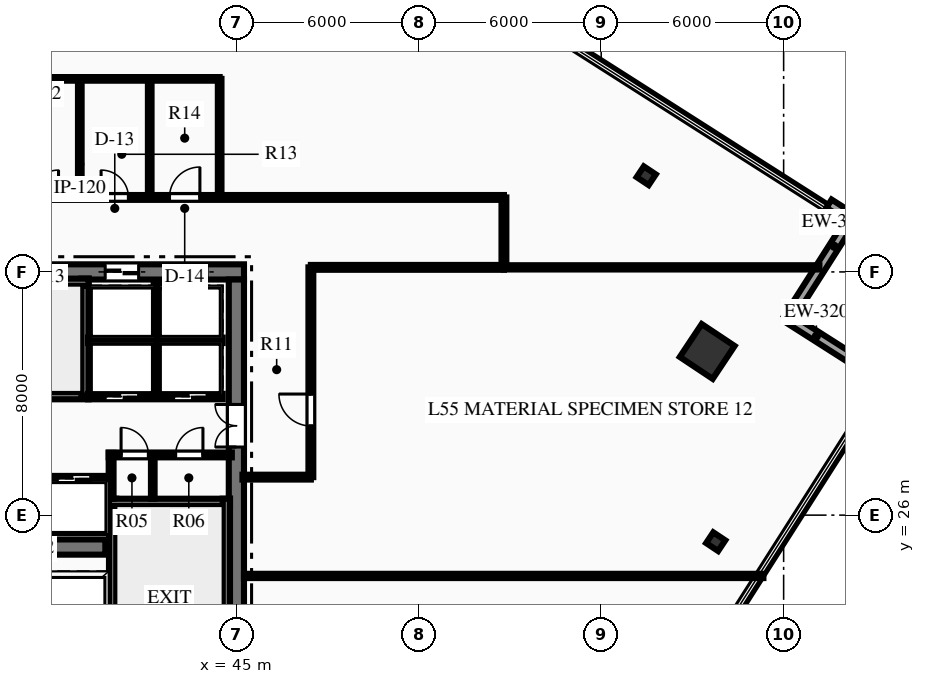
"""IFC4 building model, lengths in metres.
Left out: names, types, materials, properties, quantities, classifications, styles, units other than length and angle.
Written with IfcOpenShell. Run it as: python <this file> out.ifc"""

import sys

from ifc_helpers import new_model, si_unit, direction, frame, frame_2d, origin, origin_2d, place, context, subcontext, project, spatial, rectangle, hollow_rectangle, i_section, extrude, element, fill, save


model = new_model("IFC4")
c1 = context("Model", 3, precision=1e-05, world=origin(), true_north=direction((0.0, 1.0)))
c2 = subcontext(c1, "Body", "Model", "MODEL_VIEW")
j1 = project(units=[si_unit("LENGTHUNIT", "METRE"), si_unit("PLANEANGLEUNIT", "RADIAN")], contexts=[c1])
p1 = place(None, origin())
s1 = spatial("IfcSite", under=j1, at=p1, CompositionType="ELEMENT")
p2 = place(p1, origin())
s2 = spatial("IfcBuilding", under=s1, at=p2, CompositionType="ELEMENT")
p3 = place(p2, frame((0.0, 0.0, 220.95)))
s3 = spatial("IfcBuildingStorey", under=s2, at=p3, CompositionType="ELEMENT", Elevation=220.95)
p4 = place(p3, frame((26.75, 34.0, 0.0), z_axis=(0.0, 0.0, 1.0), x_axis=(1.0, 0.0, 0.0)))
e1 = element("IfcWall", 1, at=p4, inside=s3, PredefinedType="SHEAR", context=c2, shape_type="SweptSolid", body=[
    extrude(rectangle(XDim=18.5, YDim=0.5, at=frame_2d((9.25, 0.0))), origin(), (0.0, 0.0, 1.0), 3.75),
])
p5 = place(p4, frame((13.935, 0.0, 0.0)))
e2 = element("IfcOpeningElement", 2, at=p5, cuts=e1, PredefinedType="OPENING", context=c2, shape_type="SweptSolid", body=[
    extrude(rectangle(XDim=1.1, YDim=2.15, at=frame_2d((0.55, 1.075))), frame((0.0, 0.26, 0.0), z_axis=(0.0, -1.0, 0.0), x_axis=(1.0, 0.0, 0.0)), (0.0, 0.0, 1.0), 0.52),
])
p6 = place(p4, frame((16.185, 0.0, 0.0)))
e3 = element("IfcOpeningElement", 3, at=p6, cuts=e1, PredefinedType="OPENING", context=c2, shape_type="SweptSolid", body=[
    extrude(rectangle(XDim=1.1, YDim=2.15, at=frame_2d((0.55, 1.075))), frame((0.0, 0.26, 0.0), z_axis=(0.0, -1.0, 0.0), x_axis=(1.0, 0.0, 0.0)), (0.0, 0.0, 1.0), 0.52),
])
p7 = place(p3, frame((45.0, 18.25, 0.0), z_axis=(0.0, 0.0, 1.0), x_axis=(0.0, 1.0, 0.0)))
e4 = element("IfcWall", 4, at=p7, inside=s3, PredefinedType="SHEAR", context=c2, shape_type="SweptSolid", body=[
    extrude(rectangle(XDim=15.5, YDim=0.5, at=frame_2d((7.75, 0.0))), origin(), (0.0, 0.0, 1.0), 3.75),
])
p8 = place(p7, frame((9.99, 0.0, 0.0)))
e5 = element("IfcOpeningElement", 5, at=p8, cuts=e4, PredefinedType="OPENING", context=c2, shape_type="SweptSolid", body=[
    extrude(rectangle(XDim=1.4, YDim=2.2, at=frame_2d((0.7, 1.1))), frame((0.0, 0.26, 0.0), z_axis=(0.0, -1.0, 0.0), x_axis=(1.0, 0.0, 0.0)), (0.0, 0.0, 1.0), 0.52),
])
p9 = place(p3, frame((31.31, 24.95, 0.0), z_axis=(0.0, 0.0, 1.0), x_axis=(1.0, 0.0, 0.0)))
e6 = element("IfcWall", 6, at=p9, inside=s3, PredefinedType="SHEAR", context=c2, shape_type="SweptSolid", body=[
    extrude(rectangle(XDim=9.38, YDim=0.5, at=frame_2d((4.69, 0.0))), origin(), (0.0, 0.0, 1.0), 3.75),
])
p10 = place(p3, frame((40.93, 18.28, 0.0), z_axis=(0.0, 0.0, 1.0), x_axis=(0.0, 1.0, 0.0)))
e7 = element("IfcWall", 7, at=p10, inside=s3, PredefinedType="SHEAR", context=c2, shape_type="SweptSolid", body=[
    extrude(rectangle(XDim=8.26, YDim=0.24, at=frame_2d((4.13, 0.0))), origin(), (0.0, 0.0, 1.0), 3.75),
])
p11 = place(p10, frame((0.365, 0.0, 0.0)))
e8 = element("IfcOpeningElement", 8, at=p11, cuts=e7, PredefinedType="OPENING", context=c2, shape_type="SweptSolid", body=[
    extrude(rectangle(XDim=1.05, YDim=2.15, at=frame_2d((0.525, 1.075))), frame((0.0, 0.13, 0.0), z_axis=(0.0, -1.0, 0.0), x_axis=(1.0, 0.0, 0.0)), (0.0, 0.0, 1.0), 0.26),
])
p12 = place(p3, frame((40.81, 26.42, 0.0), z_axis=(0.0, 0.0, 1.0), x_axis=(1.0, 0.0, 0.0)))
e9 = element("IfcWall", 9, at=p12, inside=s3, PredefinedType="SHEAR", context=c2, shape_type="SweptSolid", body=[
    extrude(rectangle(XDim=3.98, YDim=0.24, at=frame_2d((1.99, 0.0))), origin(), (0.0, 0.0, 1.0), 3.75),
])
p13 = place(p3, frame((44.67, 18.28, 0.0), z_axis=(0.0, 0.0, 1.0), x_axis=(0.0, 1.0, 0.0)))
e10 = element("IfcWall", 10, at=p13, inside=s3, PredefinedType="SHEAR", context=c2, shape_type="SweptSolid", body=[
    extrude(rectangle(XDim=8.26, YDim=0.24, at=frame_2d((4.13, 0.0))), origin(), (0.0, 0.0, 1.0), 3.75),
])
p14 = place(p3, frame((31.76, 29.93, 0.0), z_axis=(0.0, 0.0, 1.0), x_axis=(1.0, 0.0, 0.0)))
e11 = element("IfcWall", 11, at=p14, inside=s3, PredefinedType="SHEAR", context=c2, shape_type="SweptSolid", body=[
    extrude(rectangle(XDim=8.38, YDim=0.24, at=frame_2d((4.19, 0.0))), origin(), (0.0, 0.0, 1.0), 3.75),
])
p15 = place(p14, frame((0.565, 0.0, 0.0)))
e12 = element("IfcOpeningElement", 12, at=p15, cuts=e11, PredefinedType="OPENING", context=c2, shape_type="SweptSolid", body=[
    extrude(rectangle(XDim=1.05, YDim=2.15, at=frame_2d((0.525, 1.075))), frame((0.0, 0.13, 0.0), z_axis=(0.0, -1.0, 0.0), x_axis=(1.0, 0.0, 0.0)), (0.0, 0.0, 1.0), 0.26),
])
p16 = place(p3, frame((40.02, 29.93, 0.0), z_axis=(0.0, 0.0, 1.0), x_axis=(0.0, 1.0, 0.0)))
e13 = element("IfcWall", 13, at=p16, inside=s3, PredefinedType="SHEAR", context=c2, shape_type="SweptSolid", body=[
    extrude(rectangle(XDim=3.85, YDim=0.24, at=frame_2d((1.925, 0.0))), origin(), (0.0, 0.0, 1.0), 3.75),
])
p17 = place(p3, frame((37.85, 33.66, 0.0), z_axis=(0.0, 0.0, 1.0), x_axis=(1.0, 0.0, 0.0)))
e14 = element("IfcWall", 14, at=p17, inside=s3, PredefinedType="SHEAR", context=c2, shape_type="SweptSolid", body=[
    extrude(rectangle(XDim=2.29, YDim=0.24, at=frame_2d((1.145, 0.0))), origin(), (0.0, 0.0, 1.0), 3.75),
])
p18 = place(p3, frame((60.486, 31.384, 0.0), z_axis=(0.0, 0.0, 1.0), x_axis=(0.554118199338, 0.832437998389, 0.0)))
e15 = element("IfcColumn", 15, at=p18, inside=s3, PredefinedType="COLUMN", context=c2, shape_type="SweptSolid", body=[
    extrude(hollow_rectangle(XDim=1.3, YDim=1.3, WallThickness=0.06, at=origin_2d()), origin(), (0.0, 0.0, 1.0), 3.75),
])
for number, where, z_axis, x_axis in (
    (16, (60.766, 25.126, 0.0), (0.0, 0.0, 1.0), (0.554, 0.832, 0.0)),
    (17, (58.481, 37.164, 0.0), (0.0, 0.0, 1.0), (0.554, 0.832, 0.0)),
):
    element("IfcColumn", number, at=place(p3, frame(where, z_axis=z_axis, x_axis=x_axis)), inside=s3, PredefinedType="COLUMN", context=c2, shape_type="SweptSolid", body=[
        extrude(i_section(OverallWidth=0.424, OverallDepth=0.474, WebThickness=0.048, FlangeThickness=0.077, at=origin_2d()), origin(), (0.0, 0.0, 1.0), 3.75),
    ])
for number, where, z_axis, x_axis in (
    (18, (63.156, 32.473, 0.0), (0.0, 0.0, 1.0), (0.843, -0.537, 0.0)),
    (19, (65.251, 35.762, 0.0), (0.0, 0.0, 1.0), (-0.537, -0.843, 0.0)),
):
    element("IfcWall", number, at=place(p3, frame(where, z_axis=z_axis, x_axis=x_axis)), inside=s3, PredefinedType="STANDARD", context=c2, shape_type="SweptSolid", body=[
        extrude(rectangle(XDim=3.9, YDim=0.32, at=frame_2d((1.95, 0.0))), origin(), (0.0, 0.0, 1.0), 3.47),
    ])
p19 = place(p3, frame((64.492, 36.246, 0.0), z_axis=(0.0, 0.0, 1.0), x_axis=(0.843348597297, -0.537366861127, 0.0)))
e20 = element("IfcWall", 20, at=p19, inside=s3, PredefinedType="STANDARD", context=c2, shape_type="SweptSolid", body=[
    extrude(rectangle(XDim=0.9, YDim=0.32, at=frame_2d((0.45, 0.0))), origin(), (0.0, 0.0, 1.0), 3.47),
])
p20 = place(p3, frame((40.8, 27.98, 0.0), z_axis=(0.0, 0.0, 1.0), x_axis=(1.0, 0.0, 0.0)))
e21 = element("IfcWall", 21, at=p20, inside=s3, PredefinedType="PARTITIONING", context=c2, shape_type="SweptSolid", body=[
    extrude(rectangle(XDim=4.05, YDim=0.16, at=frame_2d((2.025, 0.0))), origin(), (0.0, 0.0, 1.0), 3.47),
])
p21 = place(p20, frame((0.407, 0.0, 0.0)))
e22 = element("IfcOpeningElement", 22, at=p21, cuts=e21, PredefinedType="OPENING", context=c2, shape_type="SweptSolid", body=[
    extrude(rectangle(XDim=0.9, YDim=2.15, at=frame_2d((0.45, 1.075))), frame((0.0, 0.09, 0.0), z_axis=(0.0, -1.0, 0.0), x_axis=(1.0, 0.0, 0.0)), (0.0, 0.0, 1.0), 0.18),
])
p22 = place(p20, frame((2.2, 0.0, 0.0)))
e23 = element("IfcOpeningElement", 23, at=p22, cuts=e21, PredefinedType="OPENING", context=c2, shape_type="SweptSolid", body=[
    extrude(rectangle(XDim=0.9, YDim=2.15, at=frame_2d((0.45, 1.075))), frame((0.0, 0.09, 0.0), z_axis=(0.0, -1.0, 0.0), x_axis=(1.0, 0.0, 0.0)), (0.0, 0.0, 1.0), 0.18),
])
p23 = place(p3, frame((40.88, 26.54, 0.0), z_axis=(0.0, 0.0, 1.0), x_axis=(0.0, 1.0, 0.0)))
e24 = element("IfcWall", 24, at=p23, inside=s3, PredefinedType="PARTITIONING", context=c2, shape_type="SweptSolid", body=[
    extrude(rectangle(XDim=1.51, YDim=0.16, at=frame_2d((0.755, 0.0))), origin(), (0.0, 0.0, 1.0), 3.47),
])
p24 = place(p3, frame((42.25, 26.54, 0.0), z_axis=(0.0, 0.0, 1.0), x_axis=(0.0, 1.0, 0.0)))
e25 = element("IfcWall", 25, at=p24, inside=s3, PredefinedType="PARTITIONING", context=c2, shape_type="SweptSolid", body=[
    extrude(rectangle(XDim=1.44, YDim=0.12, at=frame_2d((0.72, 0.0))), origin(), (0.0, 0.0, 1.0), 3.47),
])
p25 = place(p3, frame((40.12, 29.9, 0.0), z_axis=(0.0, 0.0, 1.0), x_axis=(1.0, 0.0, 0.0)))
e26 = element("IfcWall", 26, at=p25, inside=s3, PredefinedType="PARTITIONING", context=c2, shape_type="SweptSolid", body=[
    extrude(rectangle(XDim=4.43, YDim=0.18, at=frame_2d((2.215, 0.0))), origin(), (0.0, 0.0, 1.0), 3.47),
])
p26 = place(p25, frame((0.565, 0.0, 0.0)))
e27 = element("IfcOpeningElement", 27, at=p26, cuts=e26, PredefinedType="OPENING", context=c2, shape_type="SweptSolid", body=[
    extrude(rectangle(XDim=1.1, YDim=2.15, at=frame_2d((0.55, 1.075))), frame((0.0, 0.1, 0.0), z_axis=(0.0, -1.0, 0.0), x_axis=(1.0, 0.0, 0.0)), (0.0, 0.0, 1.0), 0.2),
])
p27 = place(p25, frame((2.815, 0.0, 0.0)))
e28 = element("IfcOpeningElement", 28, at=p27, cuts=e26, PredefinedType="OPENING", context=c2, shape_type="SweptSolid", body=[
    extrude(rectangle(XDim=1.1, YDim=2.15, at=frame_2d((0.55, 1.075))), frame((0.0, 0.1, 0.0), z_axis=(0.0, -1.0, 0.0), x_axis=(1.0, 0.0, 0.0)), (0.0, 0.0, 1.0), 0.2),
])
p28 = place(p3, frame((40.12, 31.75, 0.0), z_axis=(0.0, 0.0, 1.0), x_axis=(1.0, 0.0, 0.0)))
e29 = element("IfcWall", 29, at=p28, inside=s3, PredefinedType="PARTITIONING", context=c2, shape_type="SweptSolid", body=[
    extrude(rectangle(XDim=4.43, YDim=0.18, at=frame_2d((2.215, 0.0))), origin(), (0.0, 0.0, 1.0), 3.47),
])
p29 = place(p3, frame((42.37, 29.9, 0.0), z_axis=(0.0, 0.0, 1.0), x_axis=(0.0, 1.0, 0.0)))
e30 = element("IfcWall", 30, at=p29, inside=s3, PredefinedType="PARTITIONING", context=c2, shape_type="SweptSolid", body=[
    extrude(rectangle(XDim=3.75, YDim=0.18, at=frame_2d((1.875, 0.0))), origin(), (0.0, 0.0, 1.0), 3.47),
])
p30 = place(p3, frame((31.2, 27.2, 0.0), z_axis=(0.0, 0.0, 1.0), x_axis=(1.0, 0.0, 0.0)))
e31 = element("IfcWall", 31, at=p30, inside=s3, PredefinedType="PARTITIONING", context=c2, shape_type="SweptSolid", body=[
    extrude(rectangle(XDim=9.6, YDim=0.18, at=frame_2d((4.8, 0.0))), origin(), (0.0, 0.0, 1.0), 3.47),
])
p31 = place(p30, frame((0.59, 0.0, 0.0)))
e32 = element("IfcOpeningElement", 32, at=p31, cuts=e31, PredefinedType="OPENING", context=c2, shape_type="SweptSolid", body=[
    extrude(rectangle(XDim=1.1, YDim=2.15, at=frame_2d((0.55, 1.075))), frame((0.0, 0.1, 0.0), z_axis=(0.0, -1.0, 0.0), x_axis=(1.0, 0.0, 0.0)), (0.0, 0.0, 1.0), 0.2),
])
p32 = place(p30, frame((2.99, 0.0, 0.0)))
e33 = element("IfcOpeningElement", 33, at=p32, cuts=e31, PredefinedType="OPENING", context=c2, shape_type="SweptSolid", body=[
    extrude(rectangle(XDim=1.1, YDim=2.15, at=frame_2d((0.55, 1.075))), frame((0.0, 0.1, 0.0), z_axis=(0.0, -1.0, 0.0), x_axis=(1.0, 0.0, 0.0)), (0.0, 0.0, 1.0), 0.2),
])
p33 = place(p30, frame((5.51, 0.0, 0.0)))
e34 = element("IfcOpeningElement", 34, at=p33, cuts=e31, PredefinedType="OPENING", context=c2, shape_type="SweptSolid", body=[
    extrude(rectangle(XDim=1.1, YDim=2.15, at=frame_2d((0.55, 1.075))), frame((0.0, 0.1, 0.0), z_axis=(0.0, -1.0, 0.0), x_axis=(1.0, 0.0, 0.0)), (0.0, 0.0, 1.0), 0.2),
])
p34 = place(p30, frame((7.91, 0.0, 0.0)))
e35 = element("IfcOpeningElement", 35, at=p34, cuts=e31, PredefinedType="OPENING", context=c2, shape_type="SweptSolid", body=[
    extrude(rectangle(XDim=1.1, YDim=2.15, at=frame_2d((0.55, 1.075))), frame((0.0, 0.1, 0.0), z_axis=(0.0, -1.0, 0.0), x_axis=(1.0, 0.0, 0.0)), (0.0, 0.0, 1.0), 0.2),
])
p35 = place(p3, frame((18.2, 36.45, 0.0), z_axis=(0.0, 0.0, 1.0), x_axis=(1.0, 0.0, 0.0)))
e36 = element("IfcWall", 36, at=p35, inside=s3, PredefinedType="PARTITIONING", context=c2, shape_type="SweptSolid", body=[
    extrude(rectangle(XDim=35.6, YDim=0.16, at=frame_2d((17.8, 0.0))), origin(), (0.0, 0.0, 1.0), 2.849),
])
p36 = place(p35, frame((20.05, 0.0, 0.0)))
e37 = element("IfcOpeningElement", 37, at=p36, cuts=e36, PredefinedType="OPENING", context=c2, shape_type="SweptSolid", body=[
    extrude(rectangle(XDim=0.9, YDim=2.15, at=frame_2d((0.45, 1.075))), frame((0.0, 0.09, 0.0), z_axis=(0.0, -1.0, 0.0), x_axis=(1.0, 0.0, 0.0)), (0.0, 0.0, 1.0), 0.18),
])
p37 = place(p35, frame((22.35, 0.0, 0.0)))
e38 = element("IfcOpeningElement", 38, at=p37, cuts=e36, PredefinedType="OPENING", context=c2, shape_type="SweptSolid", body=[
    extrude(rectangle(XDim=0.9, YDim=2.15, at=frame_2d((0.45, 1.075))), frame((0.0, 0.09, 0.0), z_axis=(0.0, -1.0, 0.0), x_axis=(1.0, 0.0, 0.0)), (0.0, 0.0, 1.0), 0.18),
])
p38 = place(p35, frame((24.6, 0.0, 0.0)))
e39 = element("IfcOpeningElement", 39, at=p38, cuts=e36, PredefinedType="OPENING", context=c2, shape_type="SweptSolid", body=[
    extrude(rectangle(XDim=1.0, YDim=2.15, at=frame_2d((0.5, 1.075))), frame((0.0, 0.09, 0.0), z_axis=(0.0, -1.0, 0.0), x_axis=(1.0, 0.0, 0.0)), (0.0, 0.0, 1.0), 0.18),
])
p39 = place(p35, frame((5.345, 0.0, 0.0)))
e40 = element("IfcOpeningElement", 40, at=p39, cuts=e36, PredefinedType="OPENING", context=c2, shape_type="SweptSolid", body=[
    extrude(rectangle(XDim=1.05, YDim=2.15, at=frame_2d((0.525, 1.075))), frame((0.0, 0.09, 0.0), z_axis=(0.0, -1.0, 0.0), x_axis=(1.0, 0.0, 0.0)), (0.0, 0.0, 1.0), 0.18),
])
p40 = place(p35, frame((15.395, 0.0, 0.0)))
e41 = element("IfcOpeningElement", 41, at=p40, cuts=e36, PredefinedType="OPENING", context=c2, shape_type="SweptSolid", body=[
    extrude(rectangle(XDim=1.05, YDim=2.15, at=frame_2d((0.525, 1.075))), frame((0.0, 0.09, 0.0), z_axis=(0.0, -1.0, 0.0), x_axis=(1.0, 0.0, 0.0)), (0.0, 0.0, 1.0), 0.18),
])
p41 = place(p3, frame((47.45, 34.15, 0.0), z_axis=(0.0, 0.0, 1.0), x_axis=(1.0, 0.0, 0.0)))
e42 = element("IfcWall", 42, at=p41, inside=s3, PredefinedType="PARTITIONING", context=c2, shape_type="SweptSolid", body=[
    extrude(rectangle(XDim=6.35, YDim=0.16, at=frame_2d((3.175, 0.0))), origin(), (0.0, 0.0, 1.0), 3.47),
])
p42 = place(p3, frame((47.45, 27.25, 0.0), z_axis=(0.0, 0.0, 1.0), x_axis=(0.0, 1.0, 0.0)))
e43 = element("IfcWall", 43, at=p42, inside=s3, PredefinedType="PARTITIONING", context=c2, shape_type="SweptSolid", body=[
    extrude(rectangle(XDim=6.9, YDim=0.16, at=frame_2d((3.45, 0.0))), origin(), (0.0, 0.0, 1.0), 3.47),
])
p43 = place(p42, frame((1.683, 0.0, 0.0)))
e44 = element("IfcOpeningElement", 44, at=p43, cuts=e43, PredefinedType="OPENING", context=c2, shape_type="SweptSolid", body=[
    extrude(rectangle(XDim=1.05, YDim=2.15, at=frame_2d((0.525, 1.075))), frame((0.0, 0.09, 0.0), z_axis=(0.0, -1.0, 0.0), x_axis=(1.0, 0.0, 0.0)), (0.0, 0.0, 1.0), 0.18),
])
p44 = place(p3, frame((45.2, 27.25, 0.0), z_axis=(0.0, 0.0, 1.0), x_axis=(1.0, 0.0, 0.0)))
e45 = element("IfcWall", 45, at=p44, inside=s3, PredefinedType="PARTITIONING", context=c2, shape_type="SweptSolid", body=[
    extrude(rectangle(XDim=2.25, YDim=0.16, at=frame_2d((1.125, 0.0))), origin(), (0.0, 0.0, 1.0), 3.47),
])
p45 = place(p3, frame((53.8, 34.15, 0.0), z_axis=(0.0, 0.0, 1.0), x_axis=(0.0, 1.0, 0.0)))
e46 = element("IfcWall", 46, at=p45, inside=s3, PredefinedType="PARTITIONING", context=c2, shape_type="SweptSolid", body=[
    extrude(rectangle(XDim=2.3, YDim=0.16, at=frame_2d((1.15, 0.0))), origin(), (0.0, 0.0, 1.0), 3.47),
])
for number, where, z_axis, x_axis in (
    (47, (39.85, 36.45, 0.0), (0.0, 0.0, 1.0), (0.0, 1.0, 0.0)),
    (48, (42.15, 36.45, 0.0), (0.0, 0.0, 1.0), (0.0, 1.0, 0.0)),
    (49, (44.45, 36.45, 0.0), (0.0, 0.0, 1.0), (0.0, 1.0, 0.0)),
):
    element("IfcWall", number, at=place(p3, frame(where, z_axis=z_axis, x_axis=x_axis)), inside=s3, PredefinedType="PARTITIONING", context=c2, shape_type="SweptSolid", body=[
        extrude(rectangle(XDim=3.9, YDim=0.12, at=frame_2d((1.95, 0.0))), origin(), (0.0, 0.0, 1.0), 3.47),
    ])
p46 = place(p3, frame((37.55, 40.35, 0.0), z_axis=(0.0, 0.0, 1.0), x_axis=(1.0, 0.0, 0.0)))
e50 = element("IfcWall", 50, at=p46, inside=s3, PredefinedType="PARTITIONING", context=c2, shape_type="SweptSolid", body=[
    extrude(rectangle(XDim=6.9, YDim=0.12, at=frame_2d((3.45, 0.0))), origin(), (0.0, 0.0, 1.0), 3.47),
])
p47 = place(p3, frame((53.8, 34.15, 0.0), z_axis=(0.0, 0.0, 1.0), x_axis=(1.0, 0.0, 0.0)))
e51 = element("IfcWall", 51, at=p47, inside=s3, PredefinedType="PARTITIONING", context=c2, shape_type="SweptSolid", body=[
    extrude(rectangle(XDim=10.377, YDim=0.14, at=frame_2d((5.188, 0.0))), origin(), (0.0, 0.0, 1.0), 3.47),
])
p48 = place(p3, frame((45.25, 24.0, 0.0), z_axis=(0.0, 0.0, 1.0), x_axis=(1.0, 0.0, 0.0)))
e52 = element("IfcWall", 52, at=p48, inside=s3, PredefinedType="PARTITIONING", context=c2, shape_type="SweptSolid", body=[
    extrude(rectangle(XDim=17.085, YDim=0.14, at=frame_2d((8.542, 0.0))), origin(), (0.0, 0.0, 1.0), 3.47),
])
p49 = place(p21, origin())
e53 = element("IfcDoor", 53, at=p49, inside=s3, OperationType="SINGLE_SWING_LEFT", PredefinedType="DOOR", context=c2, shape_type="SweptSolid", body=[
    extrude(rectangle(XDim=0.9, YDim=2.15, at=frame_2d((0.45, 1.075))), frame((0.0, 0.025, 0.0), z_axis=(0.0, -1.0, 0.0), x_axis=(1.0, 0.0, 0.0)), (0.0, 0.0, 1.0), 0.05),
])
fill(e22, e53)
p50 = place(p22, origin())
e54 = element("IfcDoor", 54, at=p50, inside=s3, OperationType="SINGLE_SWING_RIGHT", PredefinedType="DOOR", context=c2, shape_type="SweptSolid", body=[
    extrude(rectangle(XDim=0.9, YDim=2.15, at=frame_2d((0.45, 1.075))), frame((0.0, 0.025, 0.0), z_axis=(0.0, -1.0, 0.0), x_axis=(1.0, 0.0, 0.0)), (0.0, 0.0, 1.0), 0.05),
])
fill(e23, e54)
p51 = place(p8, origin())
e55 = element("IfcDoor", 55, at=p51, inside=s3, OperationType="DOUBLE_DOOR_SINGLE_SWING", PredefinedType="DOOR", context=c2, shape_type="SweptSolid", body=[
    extrude(rectangle(XDim=1.4, YDim=2.2, at=frame_2d((0.7, 1.1))), frame((0.0, 0.025, 0.0), z_axis=(0.0, -1.0, 0.0), x_axis=(1.0, 0.0, 0.0)), (0.0, 0.0, 1.0), 0.05),
])
fill(e5, e55)
p52 = place(p36, origin())
e56 = element("IfcDoor", 56, at=p52, inside=s3, OperationType="SINGLE_SWING_RIGHT", PredefinedType="DOOR", context=c2, shape_type="SweptSolid", body=[
    extrude(rectangle(XDim=0.9, YDim=2.15, at=frame_2d((0.45, 1.075))), frame((0.0, 0.025, 0.0), z_axis=(0.0, -1.0, 0.0), x_axis=(1.0, 0.0, 0.0)), (0.0, 0.0, 1.0), 0.05),
])
fill(e37, e56)
p53 = place(p37, origin())
e57 = element("IfcDoor", 57, at=p53, inside=s3, OperationType="SINGLE_SWING_LEFT", PredefinedType="DOOR", context=c2, shape_type="SweptSolid", body=[
    extrude(rectangle(XDim=0.9, YDim=2.15, at=frame_2d((0.45, 1.075))), frame((0.0, 0.025, 0.0), z_axis=(0.0, -1.0, 0.0), x_axis=(1.0, 0.0, 0.0)), (0.0, 0.0, 1.0), 0.05),
])
fill(e38, e57)
p54 = place(p38, origin())
e58 = element("IfcDoor", 58, at=p54, inside=s3, OperationType="SINGLE_SWING_RIGHT", PredefinedType="DOOR", context=c2, shape_type="SweptSolid", body=[
    extrude(rectangle(XDim=1.0, YDim=2.15, at=frame_2d((0.5, 1.075))), frame((0.0, 0.025, 0.0), z_axis=(0.0, -1.0, 0.0), x_axis=(1.0, 0.0, 0.0)), (0.0, 0.0, 1.0), 0.05),
])
fill(e39, e58)
p55 = place(p43, origin())
e59 = element("IfcDoor", 59, at=p55, inside=s3, OperationType="SINGLE_SWING_RIGHT", PredefinedType="DOOR", context=c2, shape_type="SweptSolid", body=[
    extrude(rectangle(XDim=1.05, YDim=2.15, at=frame_2d((0.525, 1.075))), frame((0.0, 0.025, 0.0), z_axis=(0.0, -1.0, 0.0), x_axis=(1.0, 0.0, 0.0)), (0.0, 0.0, 1.0), 0.05),
])
fill(e44, e59)
p56 = place(p26, origin())
e60 = element("IfcDoor", 60, at=p56, inside=s3, OperationType="SLIDING_TO_LEFT", PredefinedType="DOOR", context=c2, shape_type="SweptSolid", body=[
    extrude(rectangle(XDim=1.1, YDim=2.15, at=frame_2d((0.55, 1.075))), frame((0.0, 0.025, 0.0), z_axis=(0.0, -1.0, 0.0), x_axis=(1.0, 0.0, 0.0)), (0.0, 0.0, 1.0), 0.05),
])
fill(e27, e60)
p57 = place(p27, origin())
e61 = element("IfcDoor", 61, at=p57, inside=s3, OperationType="SLIDING_TO_LEFT", PredefinedType="DOOR", context=c2, shape_type="SweptSolid", body=[
    extrude(rectangle(XDim=1.1, YDim=2.15, at=frame_2d((0.55, 1.075))), frame((0.0, 0.025, 0.0), z_axis=(0.0, -1.0, 0.0), x_axis=(1.0, 0.0, 0.0)), (0.0, 0.0, 1.0), 0.05),
])
fill(e28, e61)
p58 = place(p5, origin())
e62 = element("IfcDoor", 62, at=p58, inside=s3, OperationType="SLIDING_TO_LEFT", PredefinedType="DOOR", context=c2, shape_type="SweptSolid", body=[
    extrude(rectangle(XDim=1.1, YDim=2.15, at=frame_2d((0.55, 1.075))), frame((0.0, 0.025, 0.0), z_axis=(0.0, -1.0, 0.0), x_axis=(1.0, 0.0, 0.0)), (0.0, 0.0, 1.0), 0.05),
])
fill(e2, e62)
p59 = place(p6, origin())
e63 = element("IfcDoor", 63, at=p59, inside=s3, OperationType="SLIDING_TO_LEFT", PredefinedType="DOOR", context=c2, shape_type="SweptSolid", body=[
    extrude(rectangle(XDim=1.1, YDim=2.15, at=frame_2d((0.55, 1.075))), frame((0.0, 0.025, 0.0), z_axis=(0.0, -1.0, 0.0), x_axis=(1.0, 0.0, 0.0)), (0.0, 0.0, 1.0), 0.05),
])
fill(e3, e63)
p60 = place(p34, origin())
e64 = element("IfcDoor", 64, at=p60, inside=s3, OperationType="SLIDING_TO_LEFT", PredefinedType="DOOR", context=c2, shape_type="SweptSolid", body=[
    extrude(rectangle(XDim=1.1, YDim=2.15, at=frame_2d((0.55, 1.075))), frame((0.0, 0.025, 0.0), z_axis=(0.0, -1.0, 0.0), x_axis=(1.0, 0.0, 0.0)), (0.0, 0.0, 1.0), 0.05),
])
fill(e35, e64)
save(model, sys.argv[1])
